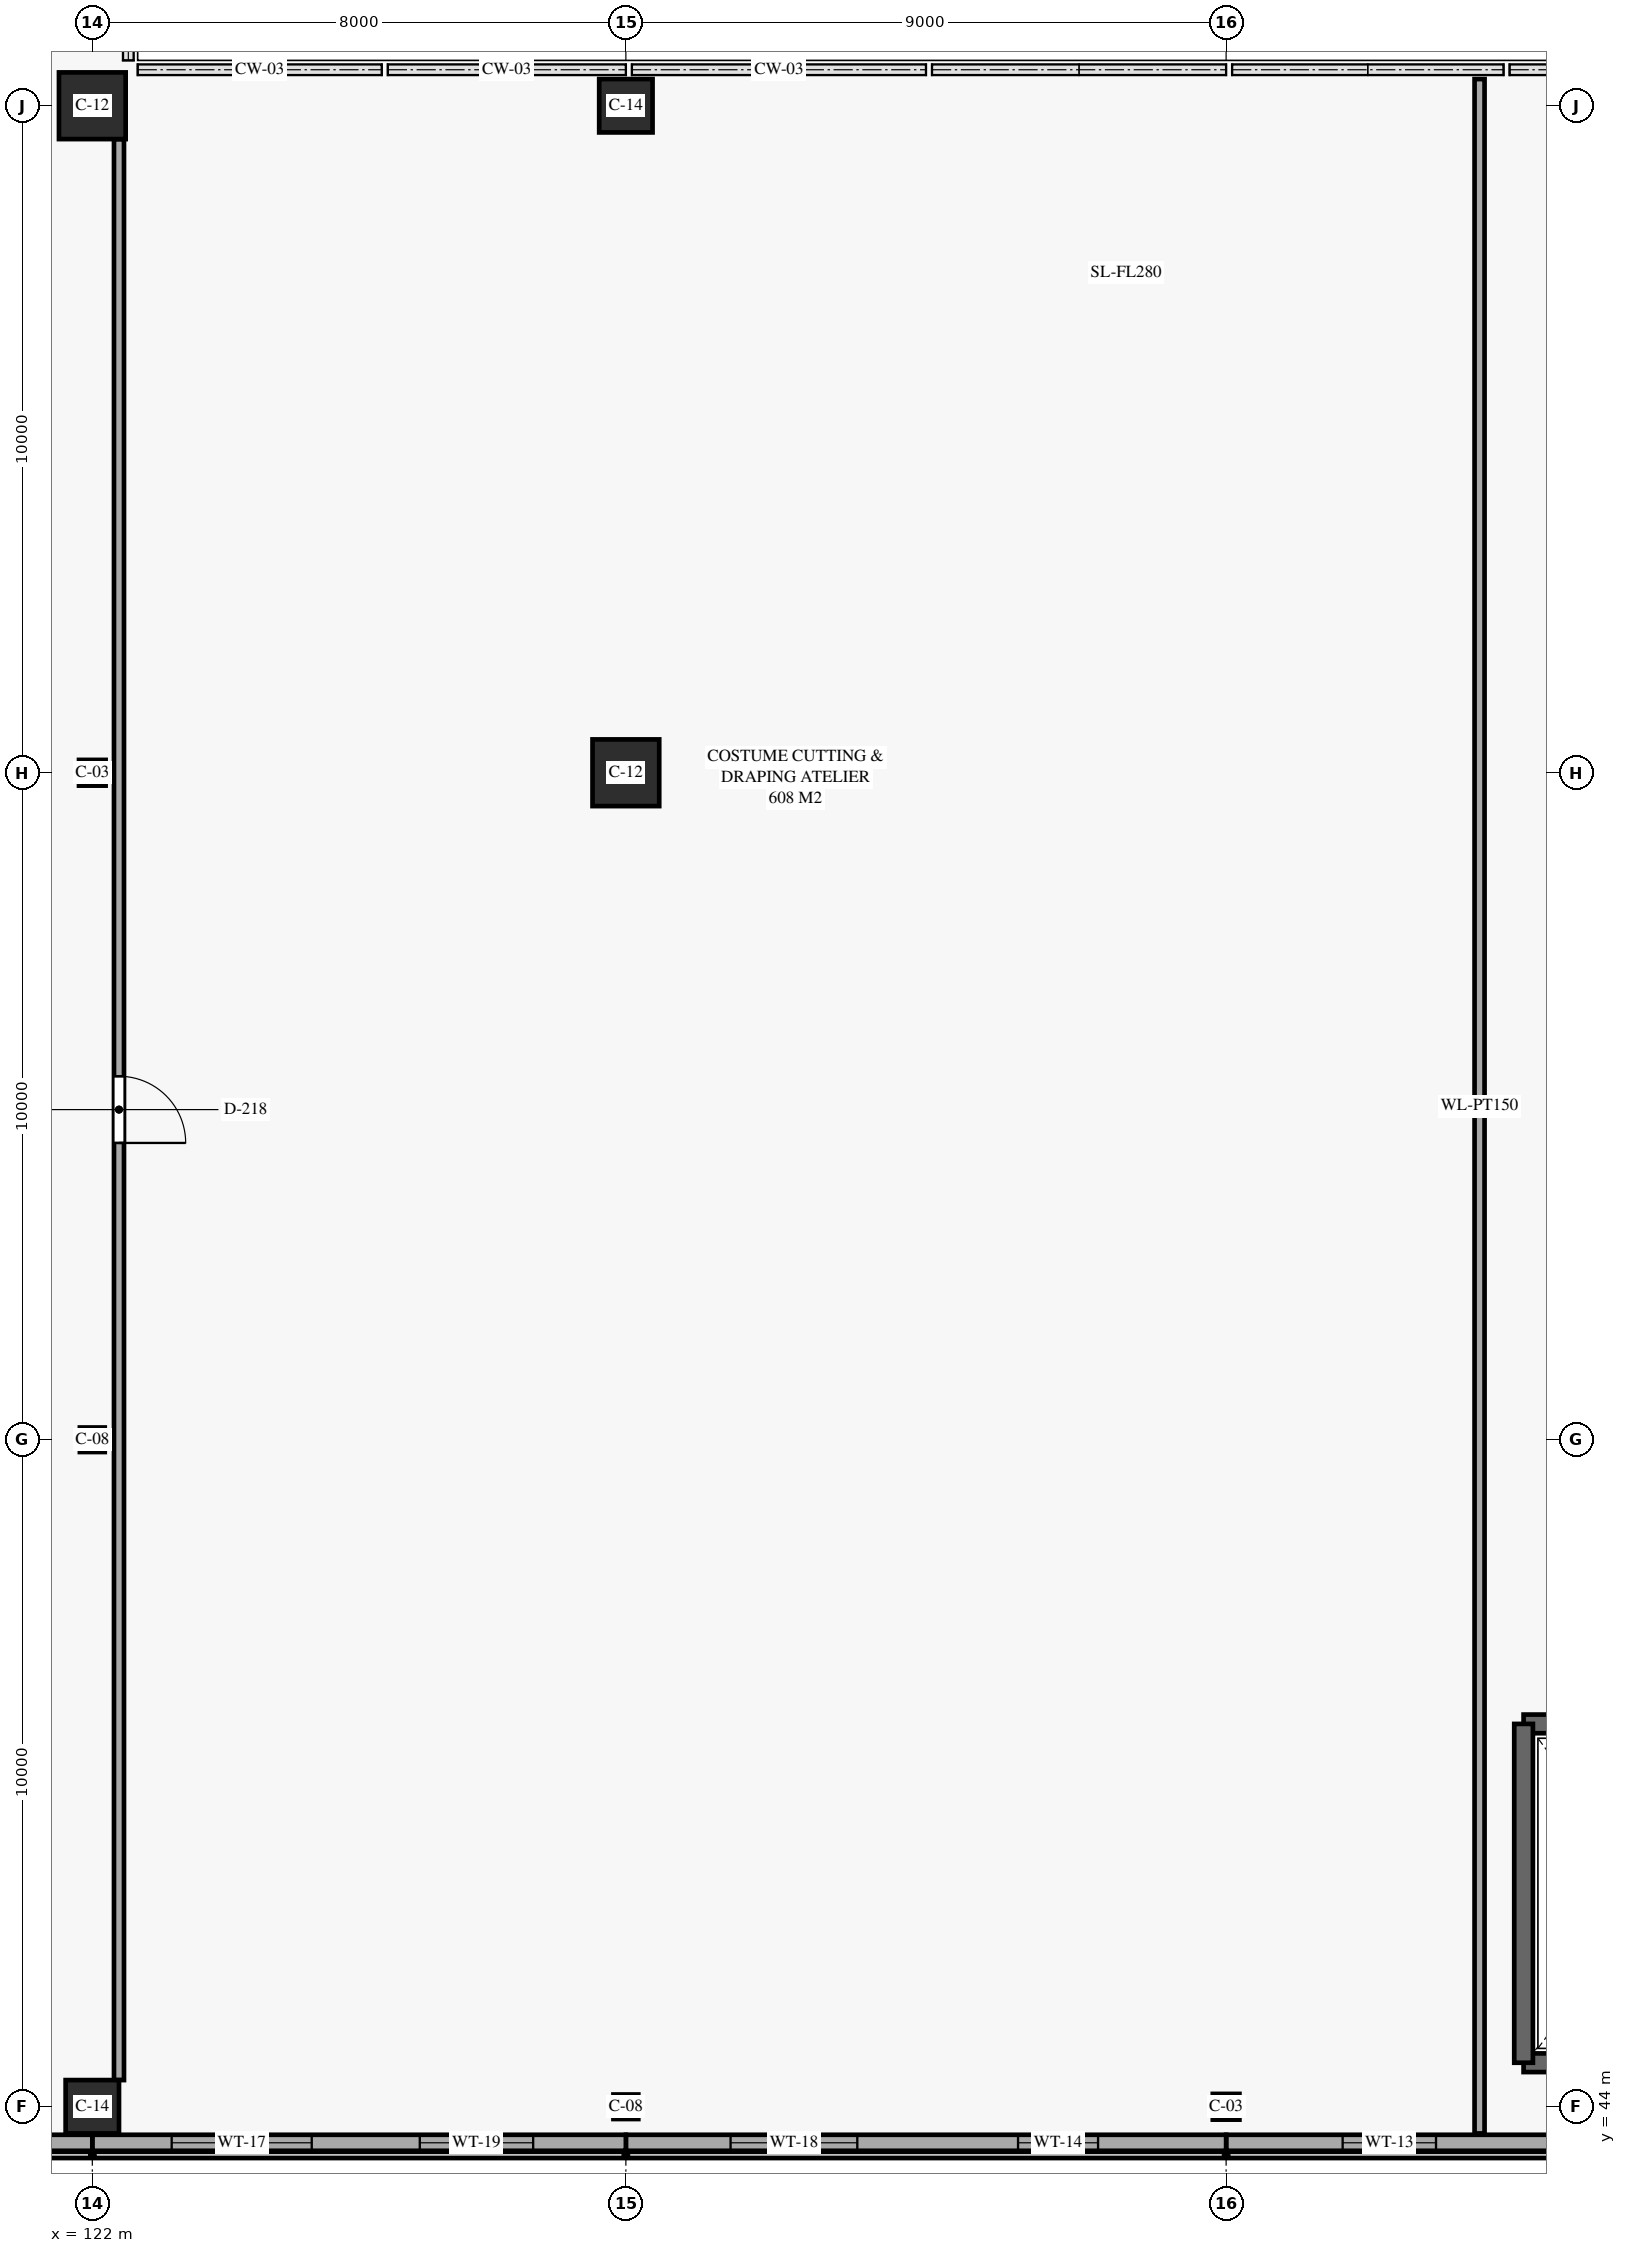
"""IFC4 building model, lengths in metres.
Left out: names, types, materials, properties, quantities, classifications, styles, units other than length and angle.
Written with IfcOpenShell. Run it as: python <this file> out.ifc"""

import sys

from ifc_helpers import new_model, si_unit, direction, frame, frame_2d, origin, origin_2d, place, context, subcontext, project, spatial, rectangle, i_section, extrude, element, fill, save


model = new_model("IFC4")
c1 = context("Model", 3, precision=1e-05, world=origin(), true_north=direction((0.0, 1.0)))
c2 = subcontext(c1, "Body", "Model", "MODEL_VIEW")
j1 = project(units=[si_unit("LENGTHUNIT", "METRE"), si_unit("PLANEANGLEUNIT", "RADIAN")], contexts=[c1])
p1 = place(None, origin())
s1 = spatial("IfcSite", under=j1, at=p1, CompositionType="ELEMENT")
p2 = place(p1, origin())
s2 = spatial("IfcBuilding", under=s1, at=p2, CompositionType="ELEMENT")
p3 = place(p2, frame((0.0, 0.0, 10.0)))
s3 = spatial("IfcBuildingStorey", under=s2, at=p3, CompositionType="ELEMENT", Elevation=10.0)
p4 = place(p3, frame((122.0, 44.0, 0.0), z_axis=(0.0, 0.0, 1.0), x_axis=(1.0, 0.0, 0.0)))
e1 = element("IfcColumn", 1, at=p4, inside=s3, PredefinedType="COLUMN", context=c2, shape_type="SweptSolid", body=[
    extrude(rectangle(XDim=0.8, YDim=0.8, at=origin_2d()), origin(), (0.0, 0.0, 1.0), 5.0),
])
p5 = place(p3, frame((122.0, 54.0, 0.0), z_axis=(0.0, 0.0, 1.0), x_axis=(1.0, 0.0, 0.0)))
e2 = element("IfcColumn", 2, at=p5, inside=s3, PredefinedType="COLUMN", context=c2, shape_type="SweptSolid", body=[
    extrude(i_section(OverallWidth=0.373, OverallDepth=0.368, WebThickness=0.015, FlangeThickness=0.024, FilletRadius=0.015, at=origin_2d()), origin(), (0.0, 0.0, 1.0), 5.0),
])
p6 = place(p3, frame((122.0, 64.0, 0.0), z_axis=(0.0, 0.0, 1.0), x_axis=(1.0, 0.0, 0.0)))
e3 = element("IfcColumn", 3, at=p6, inside=s3, PredefinedType="COLUMN", context=c2, shape_type="SweptSolid", body=[
    extrude(i_section(OverallWidth=0.399, OverallDepth=0.386, WebThickness=0.021, FlangeThickness=0.033, FilletRadius=0.016, at=origin_2d()), origin(), (0.0, 0.0, 1.0), 5.0),
])
p7 = place(p3, frame((122.0, 74.0, 0.0), z_axis=(0.0, 0.0, 1.0), x_axis=(1.0, 0.0, 0.0)))
e4 = element("IfcColumn", 4, at=p7, inside=s3, PredefinedType="COLUMN", context=c2, shape_type="SweptSolid", body=[
    extrude(rectangle(XDim=1.0, YDim=1.0, at=origin_2d()), origin(), (0.0, 0.0, 1.0), 5.0),
])
p8 = place(p3, frame((130.0, 44.0, 0.0), z_axis=(0.0, 0.0, 1.0), x_axis=(1.0, 0.0, 0.0)))
e5 = element("IfcColumn", 5, at=p8, inside=s3, PredefinedType="COLUMN", context=c2, shape_type="SweptSolid", body=[
    extrude(i_section(OverallWidth=0.373, OverallDepth=0.368, WebThickness=0.015, FlangeThickness=0.024, FilletRadius=0.015, at=origin_2d()), origin(), (0.0, 0.0, 1.0), 5.0),
])
p9 = place(p3, frame((130.0, 64.0, 0.0), z_axis=(0.0, 0.0, 1.0), x_axis=(1.0, 0.0, 0.0)))
e6 = element("IfcColumn", 6, at=p9, inside=s3, PredefinedType="COLUMN", context=c2, shape_type="SweptSolid", body=[
    extrude(rectangle(XDim=1.0, YDim=1.0, at=origin_2d()), origin(), (0.0, 0.0, 1.0), 5.0),
])
p10 = place(p3, frame((130.0, 74.0, 0.0), z_axis=(0.0, 0.0, 1.0), x_axis=(1.0, 0.0, 0.0)))
e7 = element("IfcColumn", 7, at=p10, inside=s3, PredefinedType="COLUMN", context=c2, shape_type="SweptSolid", body=[
    extrude(rectangle(XDim=0.8, YDim=0.8, at=origin_2d()), origin(), (0.0, 0.0, 1.0), 5.0),
])
p11 = place(p3, frame((139.0, 44.0, 0.0), z_axis=(0.0, 0.0, 1.0), x_axis=(1.0, 0.0, 0.0)))
e8 = element("IfcColumn", 8, at=p11, inside=s3, PredefinedType="COLUMN", context=c2, shape_type="SweptSolid", body=[
    extrude(i_section(OverallWidth=0.399, OverallDepth=0.386, WebThickness=0.021, FlangeThickness=0.033, FilletRadius=0.016, at=origin_2d()), origin(), (0.0, 0.0, 1.0), 5.0),
])
for number, where, z_axis, x_axis in (
    (9, (143.46, 44.66, 0.0), (0.0, 0.0, 1.0), (1.0, 0.0, 0.0)),
    (10, (147.34, 49.74, 0.0), (0.0, 0.0, 1.0), (-1.0, 0.0, 0.0)),
):
    element("IfcWall", number, at=place(p3, frame(where, z_axis=z_axis, x_axis=x_axis)), inside=s3, PredefinedType="SHEAR", context=c2, shape_type="SweptSolid", body=[
        extrude(rectangle(XDim=3.88, YDim=0.28, at=frame_2d((1.94, 0.0))), origin(), (0.0, 0.0, 1.0), 4.72),
    ])
p12 = place(p3, frame((143.46, 49.74, 0.0), z_axis=(0.0, 0.0, 1.0), x_axis=(0.0, -1.0, 0.0)))
e11 = element("IfcWall", 11, at=p12, inside=s3, PredefinedType="SHEAR", context=c2, shape_type="SweptSolid", body=[
    extrude(rectangle(XDim=5.08, YDim=0.28, at=frame_2d((2.54, 0.0))), origin(), (0.0, 0.0, 1.0), 4.72),
])
p13 = place(p3, frame((147.74, 43.46, 0.0), z_axis=(0.0, 0.0, 1.0), x_axis=(-1.0, 0.0, 0.0)))
e12 = element("IfcWall", 12, at=p13, inside=s3, PredefinedType="SOLIDWALL", context=c2, shape_type="SweptSolid", body=[
    extrude(rectangle(XDim=8.74, YDim=0.24, at=frame_2d((4.37, 0.0))), origin(), (0.0, 0.0, 1.0), 4.72),
])
p14 = place(p13, frame((1.647, 0.0, 0.65)))
e13 = element("IfcOpeningElement", 13, at=p14, cuts=e12, PredefinedType="OPENING", context=c2, shape_type="SweptSolid", body=[
    extrude(rectangle(XDim=1.6, YDim=2.05, at=frame_2d((0.8, 1.025))), frame((0.0, 0.13, 0.0), z_axis=(0.0, -1.0, 0.0), x_axis=(1.0, 0.0, 0.0)), (0.0, 0.0, 1.0), 0.26),
])
p15 = place(p13, frame((5.593, 0.0, 0.65)))
e14 = element("IfcOpeningElement", 14, at=p15, cuts=e12, PredefinedType="OPENING", context=c2, shape_type="SweptSolid", body=[
    extrude(rectangle(XDim=1.4, YDim=2.05, at=frame_2d((0.7, 1.025))), frame((0.0, 0.13, 0.0), z_axis=(0.0, -1.0, 0.0), x_axis=(1.0, 0.0, 0.0)), (0.0, 0.0, 1.0), 0.26),
])
p16 = place(p3, frame((139.0, 43.46, 0.0), z_axis=(0.0, 0.0, 1.0), x_axis=(-1.0, 0.0, 0.0)))
e15 = element("IfcWall", 15, at=p16, inside=s3, PredefinedType="SOLIDWALL", context=c2, shape_type="SweptSolid", body=[
    extrude(rectangle(XDim=9.0, YDim=0.24, at=frame_2d((4.5, 0.0))), origin(), (0.0, 0.0, 1.0), 4.72),
])
p17 = place(p16, frame((1.92, 0.0, 0.65)))
e16 = element("IfcOpeningElement", 16, at=p17, cuts=e15, PredefinedType="OPENING", context=c2, shape_type="SweptSolid", body=[
    extrude(rectangle(XDim=1.2, YDim=2.05, at=frame_2d((0.6, 1.025))), frame((0.0, 0.13, 0.0), z_axis=(0.0, -1.0, 0.0), x_axis=(1.0, 0.0, 0.0)), (0.0, 0.0, 1.0), 0.26),
])
p18 = place(p16, frame((5.53, 0.0, 0.8)))
e17 = element("IfcOpeningElement", 17, at=p18, cuts=e15, PredefinedType="OPENING", context=c2, shape_type="SweptSolid", body=[
    extrude(rectangle(XDim=1.9, YDim=1.8, at=frame_2d((0.95, 0.9))), frame((0.0, 0.13, 0.0), z_axis=(0.0, -1.0, 0.0), x_axis=(1.0, 0.0, 0.0)), (0.0, 0.0, 1.0), 0.26),
])
p19 = place(p3, frame((130.0, 43.46, 0.0), z_axis=(0.0, 0.0, 1.0), x_axis=(-1.0, 0.0, 0.0)))
e18 = element("IfcWall", 18, at=p19, inside=s3, PredefinedType="SOLIDWALL", context=c2, shape_type="SweptSolid", body=[
    extrude(rectangle(XDim=8.0, YDim=0.24, at=frame_2d((4.0, 0.0))), origin(), (0.0, 0.0, 1.0), 4.72),
])
p20 = place(p19, frame((1.39, 0.0, 0.8)))
e19 = element("IfcOpeningElement", 19, at=p20, cuts=e18, PredefinedType="OPENING", context=c2, shape_type="SweptSolid", body=[
    extrude(rectangle(XDim=1.7, YDim=1.8, at=frame_2d((0.85, 0.9))), frame((0.0, 0.13, 0.0), z_axis=(0.0, -1.0, 0.0), x_axis=(1.0, 0.0, 0.0)), (0.0, 0.0, 1.0), 0.26),
])
p21 = place(p19, frame((4.71, 0.0, 0.8)))
e20 = element("IfcOpeningElement", 20, at=p21, cuts=e18, PredefinedType="OPENING", context=c2, shape_type="SweptSolid", body=[
    extrude(rectangle(XDim=2.1, YDim=1.8, at=frame_2d((1.05, 0.9))), frame((0.0, 0.13, 0.0), z_axis=(0.0, -1.0, 0.0), x_axis=(1.0, 0.0, 0.0)), (0.0, 0.0, 1.0), 0.26),
])
p22 = place(p3, frame((122.0, 43.46, 0.0), z_axis=(0.0, 0.0, 1.0), x_axis=(-1.0, 0.0, 0.0)))
e21 = element("IfcWall", 21, at=p22, inside=s3, PredefinedType="SOLIDWALL", context=c2, shape_type="SweptSolid", body=[
    extrude(rectangle(XDim=7.32, YDim=0.24, at=frame_2d((3.66, 0.0))), origin(), (0.0, 0.0, 1.0), 4.72),
])
p23 = place(p22, frame((1.1, 0.0, 0.8)))
e22 = element("IfcOpeningElement", 22, at=p23, cuts=e21, PredefinedType="OPENING", context=c2, shape_type="SweptSolid", body=[
    extrude(rectangle(XDim=1.9, YDim=1.8, at=frame_2d((0.95, 0.9))), frame((0.0, 0.13, 0.0), z_axis=(0.0, -1.0, 0.0), x_axis=(1.0, 0.0, 0.0)), (0.0, 0.0, 1.0), 0.26),
])
p24 = place(p22, frame((4.42, 0.0, 0.8)))
e23 = element("IfcOpeningElement", 23, at=p24, cuts=e21, PredefinedType="OPENING", context=c2, shape_type="SweptSolid", body=[
    extrude(rectangle(XDim=1.7, YDim=1.8, at=frame_2d((0.85, 0.9))), frame((0.0, 0.13, 0.0), z_axis=(0.0, -1.0, 0.0), x_axis=(1.0, 0.0, 0.0)), (0.0, 0.0, 1.0), 0.26),
])
p25 = place(p3, frame((122.4, 73.5, 0.0), z_axis=(0.0, 0.0, 1.0), x_axis=(0.0, -1.0, 0.0)))
e24 = element("IfcWall", 24, at=p25, inside=s3, PredefinedType="PARTITIONING", context=c2, shape_type="SweptSolid", body=[
    extrude(rectangle(XDim=29.1, YDim=0.15, at=frame_2d((14.55, 0.0))), origin(), (0.0, 0.0, 1.0), 3.92),
])
p26 = place(p25, frame((14.05, 0.0, 0.0)))
e25 = element("IfcOpeningElement", 25, at=p26, cuts=e24, PredefinedType="OPENING", context=c2, shape_type="SweptSolid", body=[
    extrude(rectangle(XDim=1.0, YDim=2.15, at=frame_2d((0.5, 1.075))), frame((0.0, 0.085, 0.0), z_axis=(0.0, -1.0, 0.0), x_axis=(1.0, 0.0, 0.0)), (0.0, 0.0, 1.0), 0.17),
])
p27 = place(p3, frame((142.8, 43.6, 0.0), z_axis=(0.0, 0.0, 1.0), x_axis=(0.0, 1.0, 0.0)))
e26 = element("IfcWall", 26, at=p27, inside=s3, PredefinedType="PARTITIONING", context=c2, shape_type="SweptSolid", body=[
    extrude(rectangle(XDim=30.8, YDim=0.15, at=frame_2d((15.4, 0.0))), origin(), (0.0, 0.0, 1.0), 4.72),
])
p28 = place(p15, origin())
e27 = element("IfcWindow", 27, at=p28, inside=s3, PartitioningType="SINGLE_PANEL", PredefinedType="WINDOW", context=c2, shape_type="SweptSolid", body=[
    extrude(rectangle(XDim=1.4, YDim=2.05, at=frame_2d((0.7, 1.025))), frame((0.0, 0.03, 0.0), z_axis=(0.0, -1.0, 0.0), x_axis=(1.0, 0.0, 0.0)), (0.0, 0.0, 1.0), 0.06),
])
fill(e14, e27)
p29 = place(p17, origin())
e28 = element("IfcWindow", 28, at=p29, inside=s3, PartitioningType="SINGLE_PANEL", PredefinedType="WINDOW", context=c2, shape_type="SweptSolid", body=[
    extrude(rectangle(XDim=1.2, YDim=2.05, at=frame_2d((0.6, 1.025))), frame((0.0, 0.03, 0.0), z_axis=(0.0, -1.0, 0.0), x_axis=(1.0, 0.0, 0.0)), (0.0, 0.0, 1.0), 0.06),
])
fill(e16, e28)
p30 = place(p18, origin())
e29 = element("IfcWindow", 29, at=p30, inside=s3, PartitioningType="SINGLE_PANEL", PredefinedType="WINDOW", context=c2, shape_type="SweptSolid", body=[
    extrude(rectangle(XDim=1.9, YDim=1.8, at=frame_2d((0.95, 0.9))), frame((0.0, 0.03, 0.0), z_axis=(0.0, -1.0, 0.0), x_axis=(1.0, 0.0, 0.0)), (0.0, 0.0, 1.0), 0.06),
])
fill(e17, e29)
p31 = place(p20, origin())
e30 = element("IfcWindow", 30, at=p31, inside=s3, PartitioningType="SINGLE_PANEL", PredefinedType="WINDOW", context=c2, shape_type="SweptSolid", body=[
    extrude(rectangle(XDim=1.7, YDim=1.8, at=frame_2d((0.85, 0.9))), frame((0.0, 0.03, 0.0), z_axis=(0.0, -1.0, 0.0), x_axis=(1.0, 0.0, 0.0)), (0.0, 0.0, 1.0), 0.06),
])
fill(e19, e30)
p32 = place(p21, origin())
e31 = element("IfcWindow", 31, at=p32, inside=s3, PartitioningType="SINGLE_PANEL", PredefinedType="WINDOW", context=c2, shape_type="SweptSolid", body=[
    extrude(rectangle(XDim=2.1, YDim=1.8, at=frame_2d((1.05, 0.9))), frame((0.0, 0.03, 0.0), z_axis=(0.0, -1.0, 0.0), x_axis=(1.0, 0.0, 0.0)), (0.0, 0.0, 1.0), 0.06),
])
fill(e20, e31)
p33 = place(p26, origin())
e32 = element("IfcDoor", 32, at=p33, inside=s3, OperationType="SINGLE_SWING_RIGHT", PredefinedType="DOOR", context=c2, shape_type="SweptSolid", body=[
    extrude(rectangle(XDim=1.0, YDim=2.15, at=frame_2d((0.5, 1.075))), frame((0.0, 0.025, 0.0), z_axis=(0.0, -1.0, 0.0), x_axis=(1.0, 0.0, 0.0)), (0.0, 0.0, 1.0), 0.05),
])
fill(e25, e32)
save(model, sys.argv[1])
